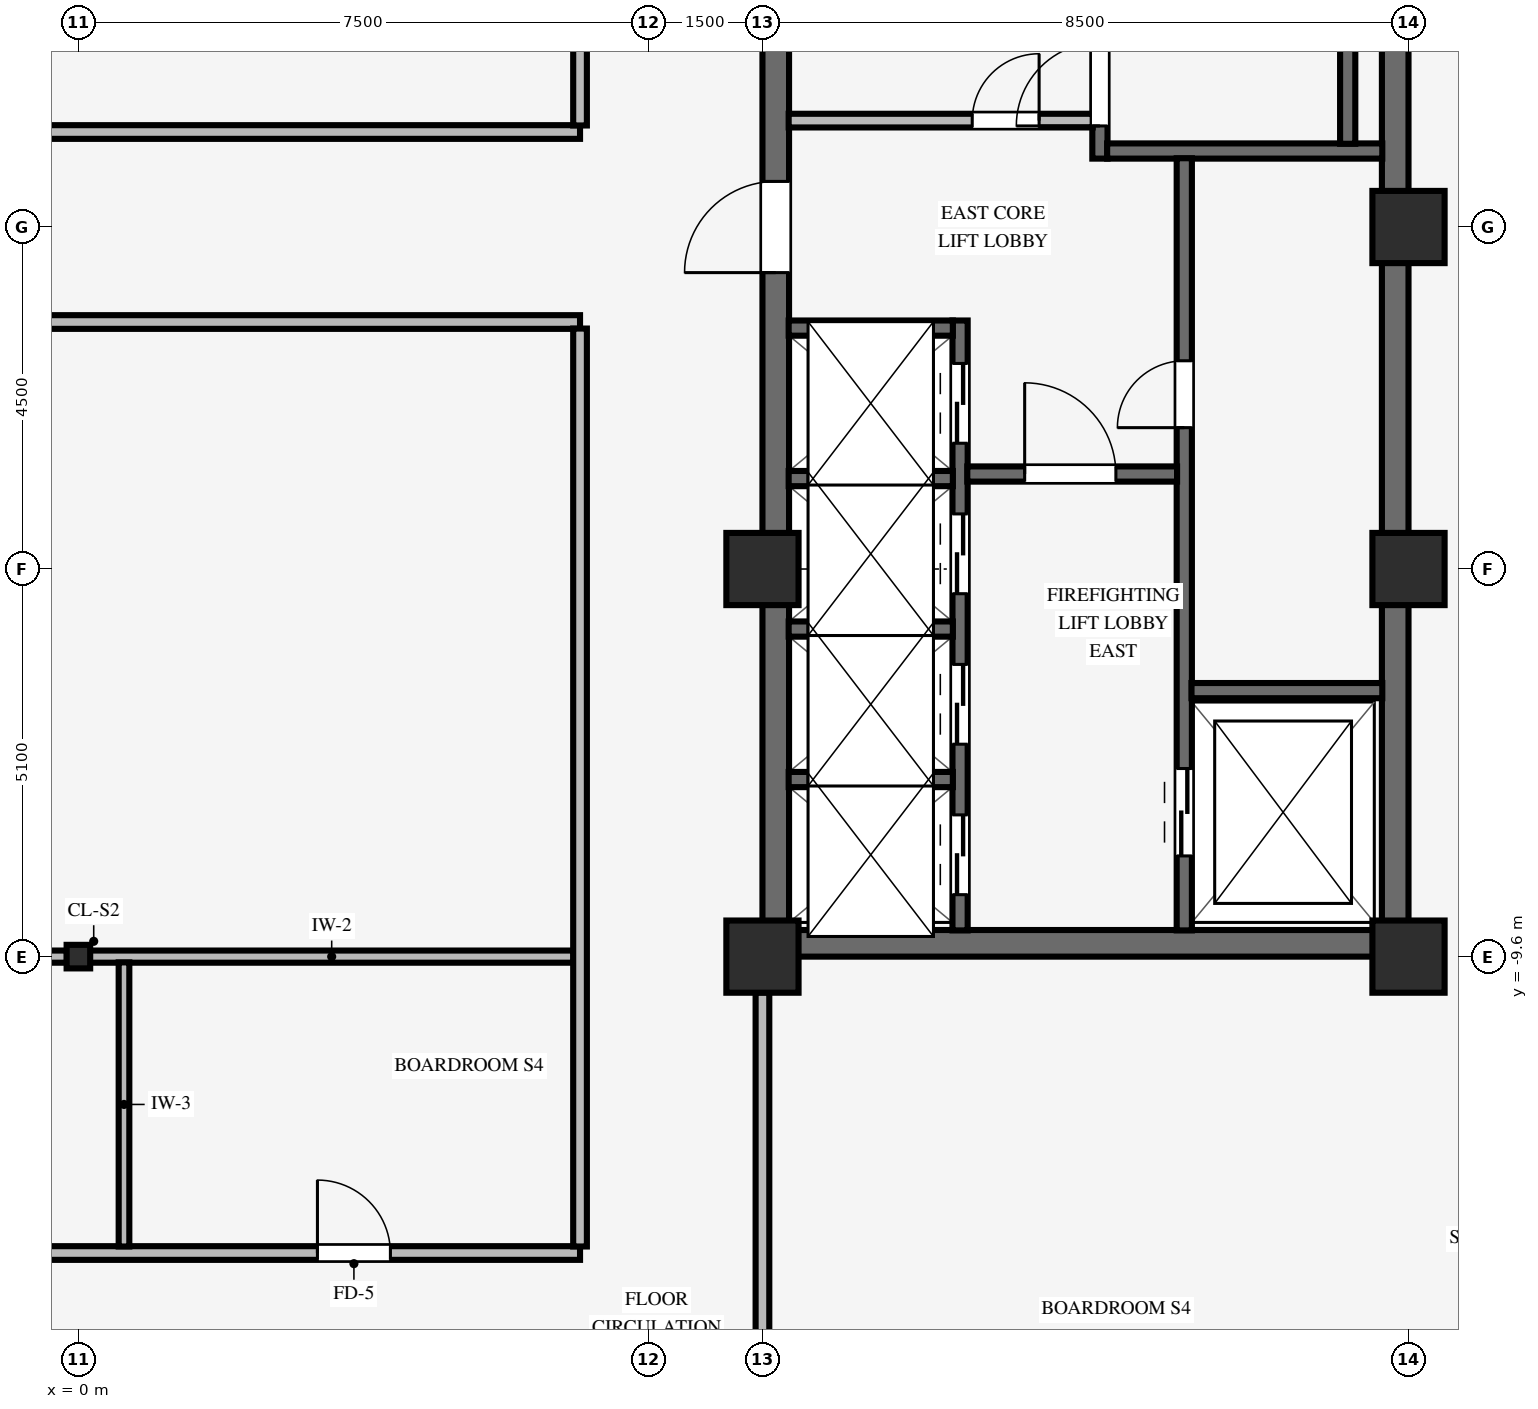
"""IFC4 building model, lengths in metres.
Left out: names, types, materials, properties, quantities, classifications, styles, units other than length and angle.
Written with IfcOpenShell. Run it as: python <this file> out.ifc"""

import sys

from ifc_helpers import new_model, si_unit, direction, frame, frame_2d, origin, origin_2d, place, context, subcontext, project, spatial, rectangle, i_section, extrude, source, transform, mapped, element, fill, save


model = new_model("IFC4")
c1 = context("Model", 3, precision=1e-05, world=origin(), true_north=direction((0.0, 1.0)))
c2 = subcontext(c1, "Body", "Model", "MODEL_VIEW")
j1 = project(units=[si_unit("LENGTHUNIT", "METRE"), si_unit("PLANEANGLEUNIT", "RADIAN")], contexts=[c1])
p1 = place(None, origin())
s1 = spatial("IfcSite", under=j1, at=p1, CompositionType="ELEMENT")
p2 = place(p1, origin())
s2 = spatial("IfcBuilding", under=s1, at=p2, CompositionType="ELEMENT")
p3 = place(p2, frame((0.0, 0.0, 209.15)))
s3 = spatial("IfcBuildingStorey", under=s2, at=p3, CompositionType="ELEMENT", Elevation=209.15)
p4 = place(p3, frame((9.0, -9.425, 0.0), z_axis=(0.0, 0.0, 1.0), x_axis=(1.0, 0.0, 0.0)))
e1 = element("IfcWall", 1, at=p4, inside=s3, PredefinedType="SHEAR", context=c2, shape_type="SweptSolid", body=[
    extrude(rectangle(XDim=8.5, YDim=0.35, at=frame_2d((4.25, 0.0))), origin(), (0.0, 0.0, 1.0), 3.37),
])
p5 = place(p3, frame((9.175, -9.255, 0.0), z_axis=(0.0, 0.0, 1.0), x_axis=(0.0, 1.0, 0.0)))
e2 = element("IfcWall", 2, at=p5, inside=s3, PredefinedType="SHEAR", context=c2, shape_type="SweptSolid", body=[
    extrude(rectangle(XDim=18.51, YDim=0.35, at=frame_2d((9.255, 0.0))), origin(), (0.0, 0.0, 1.0), 3.37),
])
p6 = place(p5, frame((8.655, 0.0, 0.0)))
e3 = element("IfcOpeningElement", 3, at=p6, cuts=e2, PredefinedType="OPENING", context=c2, shape_type="SweptSolid", body=[
    extrude(rectangle(XDim=1.2, YDim=2.15, at=frame_2d((0.6, 1.075))), frame((0.0, 0.185, 0.0), z_axis=(0.0, -1.0, 0.0), x_axis=(1.0, 0.0, 0.0)), (0.0, 0.0, 1.0), 0.37),
])
p7 = place(p3, frame((17.325, -9.255, 0.0), z_axis=(0.0, 0.0, 1.0), x_axis=(0.0, 1.0, 0.0)))
e4 = element("IfcWall", 4, at=p7, inside=s3, PredefinedType="SHEAR", context=c2, shape_type="SweptSolid", body=[
    extrude(rectangle(XDim=18.51, YDim=0.35, at=frame_2d((9.255, 0.0))), origin(), (0.0, 0.0, 1.0), 3.37),
])
for number, where, z_axis, x_axis in (
    (5, (9.0, -9.6, 0.0), (0.0, 0.0, 1.0), (1.0, 0.0, 0.0)),
    (6, (9.0, -4.5, 0.0), (0.0, 0.0, 1.0), (1.0, 0.0, 0.0)),
    (7, (17.5, -9.6, 0.0), (0.0, 0.0, 1.0), (1.0, 0.0, 0.0)),
    (8, (17.5, -4.5, 0.0), (0.0, 0.0, 1.0), (1.0, 0.0, 0.0)),
    (9, (17.5, 0.0, 0.0), (0.0, 0.0, 1.0), (1.0, 0.0, 0.0)),
):
    element("IfcColumn", number, at=place(p3, frame(where, z_axis=z_axis, x_axis=x_axis)), inside=s3, PredefinedType="COLUMN", context=c2, shape_type="SweptSolid", body=[
        extrude(rectangle(XDim=0.95, YDim=0.95, at=origin_2d()), origin(), (0.0, 0.0, 1.0), 3.37),
    ])
p8 = place(p3, frame((0.0, -9.6, 0.0), z_axis=(0.0, 0.0, 1.0), x_axis=(1.0, 0.0, 0.0)))
e10 = element("IfcColumn", 10, at=p8, inside=s3, PredefinedType="COLUMN", context=c2, shape_type="SweptSolid", body=[
    extrude(i_section(OverallWidth=0.31, OverallDepth=0.31, WebThickness=0.015, FlangeThickness=0.015, FilletRadius=0.015, at=origin_2d()), origin(), (0.0, 0.0, 1.0), 3.37),
])
p9 = place(p3, frame((13.44, 0.9, 0.0), z_axis=(0.0, 0.0, 1.0), x_axis=(0.0, 1.0, 0.0)))
e11 = element("IfcWall", 11, at=p9, inside=s3, PredefinedType="SHEAR", context=c2, shape_type="SweptSolid", body=[
    extrude(rectangle(XDim=8.355, YDim=0.2, at=frame_2d((4.177, 0.0))), origin(), (0.0, 0.0, 1.0), 3.37),
])
p10 = place(p9, frame((0.43, 0.0, 0.0)))
e12 = element("IfcOpeningElement", 12, at=p10, cuts=e11, PredefinedType="OPENING", context=c2, shape_type="SweptSolid", body=[
    extrude(rectangle(XDim=1.1, YDim=2.15, at=frame_2d((0.55, 1.075))), frame((0.0, 0.11, 0.0), z_axis=(0.0, -1.0, 0.0), x_axis=(1.0, 0.0, 0.0)), (0.0, 0.0, 1.0), 0.22),
])
p11 = place(p3, frame((13.535, 1.0, 0.0), z_axis=(0.0, 0.0, 1.0), x_axis=(1.0, 0.0, 0.0)))
e13 = element("IfcWall", 13, at=p11, inside=s3, PredefinedType="SHEAR", context=c2, shape_type="SweptSolid", body=[
    extrude(rectangle(XDim=3.62, YDim=0.2, at=frame_2d((1.81, 0.0))), origin(), (0.0, 0.0, 1.0), 3.37),
])
p12 = place(p3, frame((16.7, 1.095, 0.0), z_axis=(0.0, 0.0, 1.0), x_axis=(0.0, 1.0, 0.0)))
e14 = element("IfcWall", 14, at=p12, inside=s3, PredefinedType="SHEAR", context=c2, shape_type="SweptSolid", body=[
    extrude(rectangle(XDim=8.16, YDim=0.2, at=frame_2d((4.08, 0.0))), origin(), (0.0, 0.0, 1.0), 3.37),
])
p13 = place(p3, frame((14.55, -9.255, 0.0), z_axis=(0.0, 0.0, 1.0), x_axis=(0.0, 1.0, 0.0)))
e15 = element("IfcWall", 15, at=p13, inside=s3, PredefinedType="SHEAR", context=c2, shape_type="SweptSolid", body=[
    extrude(rectangle(XDim=10.16, YDim=0.2, at=frame_2d((5.08, 0.0))), origin(), (0.0, 0.0, 1.0), 3.37),
])
p14 = place(p13, frame((6.615, 0.0, 0.0)))
e16 = element("IfcOpeningElement", 16, at=p14, cuts=e15, PredefinedType="OPENING", context=c2, shape_type="SweptSolid", body=[
    extrude(rectangle(XDim=0.88, YDim=2.1, at=frame_2d((0.44, 1.05))), frame((0.0, 0.11, 0.0), z_axis=(0.0, -1.0, 0.0), x_axis=(1.0, 0.0, 0.0)), (0.0, 0.0, 1.0), 0.22),
])
p15 = place(p13, frame((0.98, 0.0, 0.0)))
e17 = element("IfcOpeningElement", 17, at=p15, cuts=e15, PredefinedType="OPENING", context=c2, shape_type="SweptSolid", body=[
    extrude(rectangle(XDim=1.15, YDim=2.15, at=frame_2d((0.575, 1.075))), frame((0.0, 0.11, 0.0), z_axis=(0.0, -1.0, 0.0), x_axis=(1.0, 0.0, 0.0)), (0.0, 0.0, 1.0), 0.22),
])
p16 = place(p3, frame((14.645, -6.1, 0.0), z_axis=(0.0, 0.0, 1.0), x_axis=(1.0, 0.0, 0.0)))
e18 = element("IfcWall", 18, at=p16, inside=s3, PredefinedType="SHEAR", context=c2, shape_type="SweptSolid", body=[
    extrude(rectangle(XDim=2.51, YDim=0.2, at=frame_2d((1.255, 0.0))), origin(), (0.0, 0.0, 1.0), 3.37),
])
p17 = place(p3, frame((11.6, -9.255, 0.0), z_axis=(0.0, 0.0, 1.0), x_axis=(0.0, 1.0, 0.0)))
e19 = element("IfcWall", 19, at=p17, inside=s3, PredefinedType="SHEAR", context=c2, shape_type="SweptSolid", body=[
    extrude(rectangle(XDim=8.025, YDim=0.2, at=frame_2d((4.012, 0.0))), origin(), (0.0, 0.0, 1.0), 3.37),
])
p18 = place(p17, frame((0.47, 0.0, 0.0)))
e20 = element("IfcOpeningElement", 20, at=p18, cuts=e19, PredefinedType="OPENING", context=c2, shape_type="SweptSolid", body=[
    extrude(rectangle(XDim=1.05, YDim=2.15, at=frame_2d((0.525, 1.075))), frame((0.0, 0.11, 0.0), z_axis=(0.0, -1.0, 0.0), x_axis=(1.0, 0.0, 0.0)), (0.0, 0.0, 1.0), 0.22),
])
p19 = place(p17, frame((2.45, 0.0, 0.0)))
e21 = element("IfcOpeningElement", 21, at=p19, cuts=e19, PredefinedType="OPENING", context=c2, shape_type="SweptSolid", body=[
    extrude(rectangle(XDim=1.05, YDim=2.15, at=frame_2d((0.525, 1.075))), frame((0.0, 0.11, 0.0), z_axis=(0.0, -1.0, 0.0), x_axis=(1.0, 0.0, 0.0)), (0.0, 0.0, 1.0), 0.22),
])
p20 = place(p17, frame((4.43, 0.0, 0.0)))
e22 = element("IfcOpeningElement", 22, at=p20, cuts=e19, PredefinedType="OPENING", context=c2, shape_type="SweptSolid", body=[
    extrude(rectangle(XDim=1.05, YDim=2.15, at=frame_2d((0.525, 1.075))), frame((0.0, 0.11, 0.0), z_axis=(0.0, -1.0, 0.0), x_axis=(1.0, 0.0, 0.0)), (0.0, 0.0, 1.0), 0.22),
])
p21 = place(p17, frame((6.41, 0.0, 0.0)))
e23 = element("IfcOpeningElement", 23, at=p21, cuts=e19, PredefinedType="OPENING", context=c2, shape_type="SweptSolid", body=[
    extrude(rectangle(XDim=1.05, YDim=2.15, at=frame_2d((0.525, 1.075))), frame((0.0, 0.11, 0.0), z_axis=(0.0, -1.0, 0.0), x_axis=(1.0, 0.0, 0.0)), (0.0, 0.0, 1.0), 0.22),
])
p22 = place(p3, frame((11.695, -3.25, 0.0), z_axis=(0.0, 0.0, 1.0), x_axis=(1.0, 0.0, 0.0)))
e24 = element("IfcWall", 24, at=p22, inside=s3, PredefinedType="SHEAR", context=c2, shape_type="SweptSolid", body=[
    extrude(rectangle(XDim=2.76, YDim=0.2, at=frame_2d((1.38, 0.0))), origin(), (0.0, 0.0, 1.0), 3.37),
])
p23 = place(p22, frame((0.755, 0.0, 0.0)))
e25 = element("IfcOpeningElement", 25, at=p23, cuts=e24, PredefinedType="OPENING", context=c2, shape_type="SweptSolid", body=[
    extrude(rectangle(XDim=1.2, YDim=2.15, at=frame_2d((0.6, 1.075))), frame((0.0, 0.11, 0.0), z_axis=(0.0, -1.0, 0.0), x_axis=(1.0, 0.0, 0.0)), (0.0, 0.0, 1.0), 0.22),
])
for number, where, z_axis, x_axis in (
    (26, (9.345, -7.27, 0.0), (0.0, 0.0, 1.0), (1.0, 0.0, 0.0)),
    (27, (9.345, -5.29, 0.0), (0.0, 0.0, 1.0), (1.0, 0.0, 0.0)),
    (28, (9.345, -3.31, 0.0), (0.0, 0.0, 1.0), (1.0, 0.0, 0.0)),
    (29, (9.345, -1.33, 0.0), (0.0, 0.0, 1.0), (1.0, 0.0, 0.0)),
):
    element("IfcWall", number, at=place(p3, frame(where, z_axis=z_axis, x_axis=x_axis)), inside=s3, PredefinedType="SHEAR", context=c2, shape_type="SweptSolid", body=[
        extrude(rectangle(XDim=2.16, YDim=0.2, at=frame_2d((1.08, 0.0))), origin(), (0.0, 0.0, 1.0), 3.37),
    ])
p24 = place(p3, frame((9.345, 1.4, 0.0), z_axis=(0.0, 0.0, 1.0), x_axis=(1.0, 0.0, 0.0)))
e30 = element("IfcWall", 30, at=p24, inside=s3, PredefinedType="PARTITIONING", context=c2, shape_type="SweptSolid", body=[
    extrude(rectangle(XDim=4.0, YDim=0.18, at=frame_2d((2.0, 0.0))), origin(), (0.0, 0.0, 1.0), 3.36),
])
p25 = place(p24, frame((2.415, 0.0, 0.0)))
e31 = element("IfcOpeningElement", 31, at=p25, cuts=e30, PredefinedType="OPENING", context=c2, shape_type="SweptSolid", body=[
    extrude(rectangle(XDim=0.88, YDim=2.1, at=frame_2d((0.44, 1.05))), frame((0.0, 0.1, 0.0), z_axis=(0.0, -1.0, 0.0), x_axis=(1.0, 0.0, 0.0)), (0.0, 0.0, 1.0), 0.2),
])
p26 = place(p3, frame((-17.7, -13.5, 0.0), z_axis=(0.0, 0.0, 1.0), x_axis=(1.0, 0.0, 0.0)))
e32 = element("IfcWall", 32, at=p26, inside=s3, PredefinedType="PARTITIONING", context=c2, shape_type="SweptSolid", body=[
    extrude(rectangle(XDim=24.3, YDim=0.18, at=frame_2d((12.15, 0.0))), origin(), (0.0, 0.0, 1.0), 3.008),
])
p27 = place(p26, frame((8.695, 0.0, 0.0)))
e33 = element("IfcOpeningElement", 33, at=p27, cuts=e32, PredefinedType="OPENING", context=c2, shape_type="SweptSolid", body=[
    extrude(rectangle(XDim=0.96, YDim=2.1, at=frame_2d((0.48, 1.05))), frame((0.0, 0.1, 0.0), z_axis=(0.0, -1.0, 0.0), x_axis=(1.0, 0.0, 0.0)), (0.0, 0.0, 1.0), 0.2),
])
p28 = place(p26, frame((20.845, 0.0, 0.0)))
e34 = element("IfcOpeningElement", 34, at=p28, cuts=e32, PredefinedType="OPENING", context=c2, shape_type="SweptSolid", body=[
    extrude(rectangle(XDim=0.96, YDim=2.1, at=frame_2d((0.48, 1.05))), frame((0.0, 0.1, 0.0), z_axis=(0.0, -1.0, 0.0), x_axis=(1.0, 0.0, 0.0)), (0.0, 0.0, 1.0), 0.2),
])
p29 = place(p3, frame((-8.529, -9.6, 0.0), z_axis=(0.0, 0.0, 1.0), x_axis=(1.0, 0.0, 0.0)))
e35 = element("IfcWall", 35, at=p29, inside=s3, PredefinedType="PARTITIONING", context=c2, shape_type="SweptSolid", body=[
    extrude(rectangle(XDim=8.378, YDim=0.16, at=frame_2d((4.189, 0.0))), origin(), (0.0, 0.0, 1.0), 2.405),
])
p30 = place(p3, frame((0.151, -9.6, 0.0), z_axis=(0.0, 0.0, 1.0), x_axis=(1.0, 0.0, 0.0)))
e36 = element("IfcWall", 36, at=p30, inside=s3, PredefinedType="PARTITIONING", context=c2, shape_type="SweptSolid", body=[
    extrude(rectangle(XDim=6.363, YDim=0.16, at=frame_2d((3.182, 0.0))), origin(), (0.0, 0.0, 1.0), 2.405),
])
p31 = place(p3, frame((-9.0, -1.25, 0.0), z_axis=(0.0, 0.0, 1.0), x_axis=(1.0, 0.0, 0.0)))
e37 = element("IfcWall", 37, at=p31, inside=s3, PredefinedType="PARTITIONING", context=c2, shape_type="SweptSolid", body=[
    extrude(rectangle(XDim=15.6, YDim=0.18, at=frame_2d((7.8, 0.0))), origin(), (0.0, 0.0, 1.0), 3.36),
])
p32 = place(p31, frame((7.32, 0.0, 0.0)))
e38 = element("IfcOpeningElement", 38, at=p32, cuts=e37, PredefinedType="OPENING", context=c2, shape_type="SweptSolid", body=[
    extrude(rectangle(XDim=0.96, YDim=2.1, at=frame_2d((0.48, 1.05))), frame((0.0, 0.1, 0.0), z_axis=(0.0, -1.0, 0.0), x_axis=(1.0, 0.0, 0.0)), (0.0, 0.0, 1.0), 0.2),
])
p33 = place(p3, frame((-9.0, 1.25, 0.0), z_axis=(0.0, 0.0, 1.0), x_axis=(1.0, 0.0, 0.0)))
e39 = element("IfcWall", 39, at=p33, inside=s3, PredefinedType="PARTITIONING", context=c2, shape_type="SweptSolid", body=[
    extrude(rectangle(XDim=15.6, YDim=0.18, at=frame_2d((7.8, 0.0))), origin(), (0.0, 0.0, 1.0), 3.36),
])
p34 = place(p33, frame((3.32, 0.0, 0.0)))
e40 = element("IfcOpeningElement", 40, at=p34, cuts=e39, PredefinedType="OPENING", context=c2, shape_type="SweptSolid", body=[
    extrude(rectangle(XDim=0.96, YDim=2.1, at=frame_2d((0.48, 1.05))), frame((0.0, 0.1, 0.0), z_axis=(0.0, -1.0, 0.0), x_axis=(1.0, 0.0, 0.0)), (0.0, 0.0, 1.0), 0.2),
])
p35 = place(p3, frame((0.6, -13.414, 0.0), z_axis=(0.0, 0.0, 1.0), x_axis=(0.0, 1.0, 0.0)))
e41 = element("IfcWall", 41, at=p35, inside=s3, PredefinedType="PARTITIONING", context=c2, shape_type="SweptSolid", body=[
    extrude(rectangle(XDim=3.738, YDim=0.14, at=frame_2d((1.869, 0.0))), origin(), (0.0, 0.0, 1.0), 3.36),
])
p36 = place(p3, frame((6.6, -13.414, 0.0), z_axis=(0.0, 0.0, 1.0), x_axis=(0.0, 1.0, 0.0)))
e42 = element("IfcWall", 42, at=p36, inside=s3, PredefinedType="PARTITIONING", context=c2, shape_type="SweptSolid", body=[
    extrude(rectangle(XDim=12.078, YDim=0.18, at=frame_2d((6.039, 0.0))), origin(), (0.0, 0.0, 1.0), 3.36),
])
p37 = place(p3, frame((6.6, 1.336, 0.0), z_axis=(0.0, 0.0, 1.0), x_axis=(0.0, 1.0, 0.0)))
e43 = element("IfcWall", 43, at=p37, inside=s3, PredefinedType="PARTITIONING", context=c2, shape_type="SweptSolid", body=[
    extrude(rectangle(XDim=12.078, YDim=0.18, at=frame_2d((6.039, 0.0))), origin(), (0.0, 0.0, 1.0), 3.36),
])
p38 = place(p37, frame((3.652, 0.0, 0.0)))
e44 = element("IfcOpeningElement", 44, at=p38, cuts=e43, PredefinedType="OPENING", context=c2, shape_type="SweptSolid", body=[
    extrude(rectangle(XDim=0.96, YDim=2.1, at=frame_2d((0.48, 1.05))), frame((0.0, 0.1, 0.0), z_axis=(0.0, -1.0, 0.0), x_axis=(1.0, 0.0, 0.0)), (0.0, 0.0, 1.0), 0.2),
])
p39 = place(p37, frame((9.721, 0.0, 0.0)))
e45 = element("IfcOpeningElement", 45, at=p39, cuts=e43, PredefinedType="OPENING", context=c2, shape_type="SweptSolid", body=[
    extrude(rectangle(XDim=0.9, YDim=2.1, at=frame_2d((0.45, 1.05))), frame((0.0, 0.1, 0.0), z_axis=(0.0, -1.0, 0.0), x_axis=(1.0, 0.0, 0.0)), (0.0, 0.0, 1.0), 0.2),
])
p40 = place(p3, frame((9.0, -15.814, 0.0), z_axis=(0.0, 0.0, 1.0), x_axis=(0.0, 1.0, 0.0)))
e46 = element("IfcWall", 46, at=p40, inside=s3, PredefinedType="PARTITIONING", context=c2, shape_type="SweptSolid", body=[
    extrude(rectangle(XDim=5.743, YDim=0.18, at=frame_2d((2.872, 0.0))), origin(), (0.0, 0.0, 1.0), 2.816),
])
m1 = source(origin(), c2, "Body", "SweptSolid", [
    extrude(rectangle(XDim=1.1, YDim=2.15, at=frame_2d((0.55, 1.075))), frame((0.0, 0.025, 0.0), z_axis=(0.0, -1.0, 0.0), x_axis=(1.0, 0.0, 0.0)), (0.0, 0.0, 1.0), 0.05),
])
p41 = place(p10, origin())
e47 = element("IfcDoor", 47, at=p41, inside=s3, OperationType="SINGLE_SWING_LEFT", PredefinedType="DOOR", context=c2, shape_type="MappedRepresentation", body=[
    mapped(m1, transform((0.0, 0.0, 0.0), scale=1.0)),
])
fill(e12, e47)
m2 = source(origin(), c2, "Body", "SweptSolid", [
    extrude(rectangle(XDim=0.88, YDim=2.1, at=frame_2d((0.44, 1.05))), frame((0.0, 0.025, 0.0), z_axis=(0.0, -1.0, 0.0), x_axis=(1.0, 0.0, 0.0)), (0.0, 0.0, 1.0), 0.05),
])
p42 = place(p14, origin())
e48 = element("IfcDoor", 48, at=p42, inside=s3, OperationType="SINGLE_SWING_LEFT", PredefinedType="DOOR", context=c2, shape_type="MappedRepresentation", body=[
    mapped(m2, transform((0.0, 0.0, 0.0), scale=1.0)),
])
fill(e16, e48)
m3 = source(origin(), c2, "Body", "SweptSolid", [
    extrude(rectangle(XDim=1.2, YDim=2.15, at=frame_2d((0.6, 1.075))), frame((0.0, 0.025, 0.0), z_axis=(0.0, -1.0, 0.0), x_axis=(1.0, 0.0, 0.0)), (0.0, 0.0, 1.0), 0.05),
])
p43 = place(p23, origin())
e49 = element("IfcDoor", 49, at=p43, inside=s3, OperationType="SINGLE_SWING_LEFT", PredefinedType="DOOR", context=c2, shape_type="MappedRepresentation", body=[
    mapped(m3, transform((0.0, 0.0, 0.0), scale=1.0)),
])
fill(e25, e49)
p44 = place(p6, origin())
e50 = element("IfcDoor", 50, at=p44, inside=s3, OperationType="SINGLE_SWING_LEFT", PredefinedType="DOOR", context=c2, shape_type="MappedRepresentation", body=[
    mapped(m3, transform((0.0, 0.0, 0.0), scale=1.0)),
])
fill(e3, e50)
p45 = place(p25, origin())
e51 = element("IfcDoor", 51, at=p45, inside=s3, OperationType="SINGLE_SWING_RIGHT", PredefinedType="DOOR", context=c2, shape_type="MappedRepresentation", body=[
    mapped(m2, transform((0.0, 0.0, 0.0), scale=1.0)),
])
fill(e31, e51)
m4 = source(origin(), c2, "Body", "SweptSolid", [
    extrude(rectangle(XDim=1.15, YDim=2.15, at=frame_2d((0.575, 1.075))), frame((0.0, 0.025, 0.0), z_axis=(0.0, -1.0, 0.0), x_axis=(1.0, 0.0, 0.0)), (0.0, 0.0, 1.0), 0.05),
])
p46 = place(p15, origin())
e52 = element("IfcDoor", 52, at=p46, inside=s3, OperationType="DOUBLE_DOOR_SLIDING", PredefinedType="DOOR", context=c2, shape_type="MappedRepresentation", body=[
    mapped(m4, transform((0.0, 0.0, 0.0), scale=1.0)),
])
fill(e17, e52)
m5 = source(origin(), c2, "Body", "SweptSolid", [
    extrude(rectangle(XDim=1.05, YDim=2.15, at=frame_2d((0.525, 1.075))), frame((0.0, 0.025, 0.0), z_axis=(0.0, -1.0, 0.0), x_axis=(1.0, 0.0, 0.0)), (0.0, 0.0, 1.0), 0.05),
])
p47 = place(p18, origin())
e53 = element("IfcDoor", 53, at=p47, inside=s3, OperationType="DOUBLE_DOOR_SLIDING", PredefinedType="DOOR", context=c2, shape_type="MappedRepresentation", body=[
    mapped(m5, transform((0.0, 0.0, 0.0), scale=1.0)),
])
fill(e20, e53)
p48 = place(p19, origin())
e54 = element("IfcDoor", 54, at=p48, inside=s3, OperationType="DOUBLE_DOOR_SLIDING", PredefinedType="DOOR", context=c2, shape_type="MappedRepresentation", body=[
    mapped(m5, transform((0.0, 0.0, 0.0), scale=1.0)),
])
fill(e21, e54)
p49 = place(p20, origin())
e55 = element("IfcDoor", 55, at=p49, inside=s3, OperationType="DOUBLE_DOOR_SLIDING", PredefinedType="DOOR", context=c2, shape_type="MappedRepresentation", body=[
    mapped(m5, transform((0.0, 0.0, 0.0), scale=1.0)),
])
fill(e22, e55)
p50 = place(p21, origin())
e56 = element("IfcDoor", 56, at=p50, inside=s3, OperationType="DOUBLE_DOOR_SLIDING", PredefinedType="DOOR", context=c2, shape_type="MappedRepresentation", body=[
    mapped(m5, transform((0.0, 0.0, 0.0), scale=1.0)),
])
fill(e23, e56)
m6 = source(origin(), c2, "Body", "SweptSolid", [
    extrude(rectangle(XDim=0.96, YDim=2.1, at=frame_2d((0.48, 1.05))), frame((0.0, 0.025, 0.0), z_axis=(0.0, -1.0, 0.0), x_axis=(1.0, 0.0, 0.0)), (0.0, 0.0, 1.0), 0.05),
])
p51 = place(p28, origin())
e57 = element("IfcDoor", 57, at=p51, inside=s3, OperationType="SINGLE_SWING_LEFT", PredefinedType="DOOR", context=c2, shape_type="MappedRepresentation", body=[
    mapped(m6, transform((0.0, 0.0, 0.0), scale=1.0)),
])
fill(e34, e57)
save(model, sys.argv[1])
